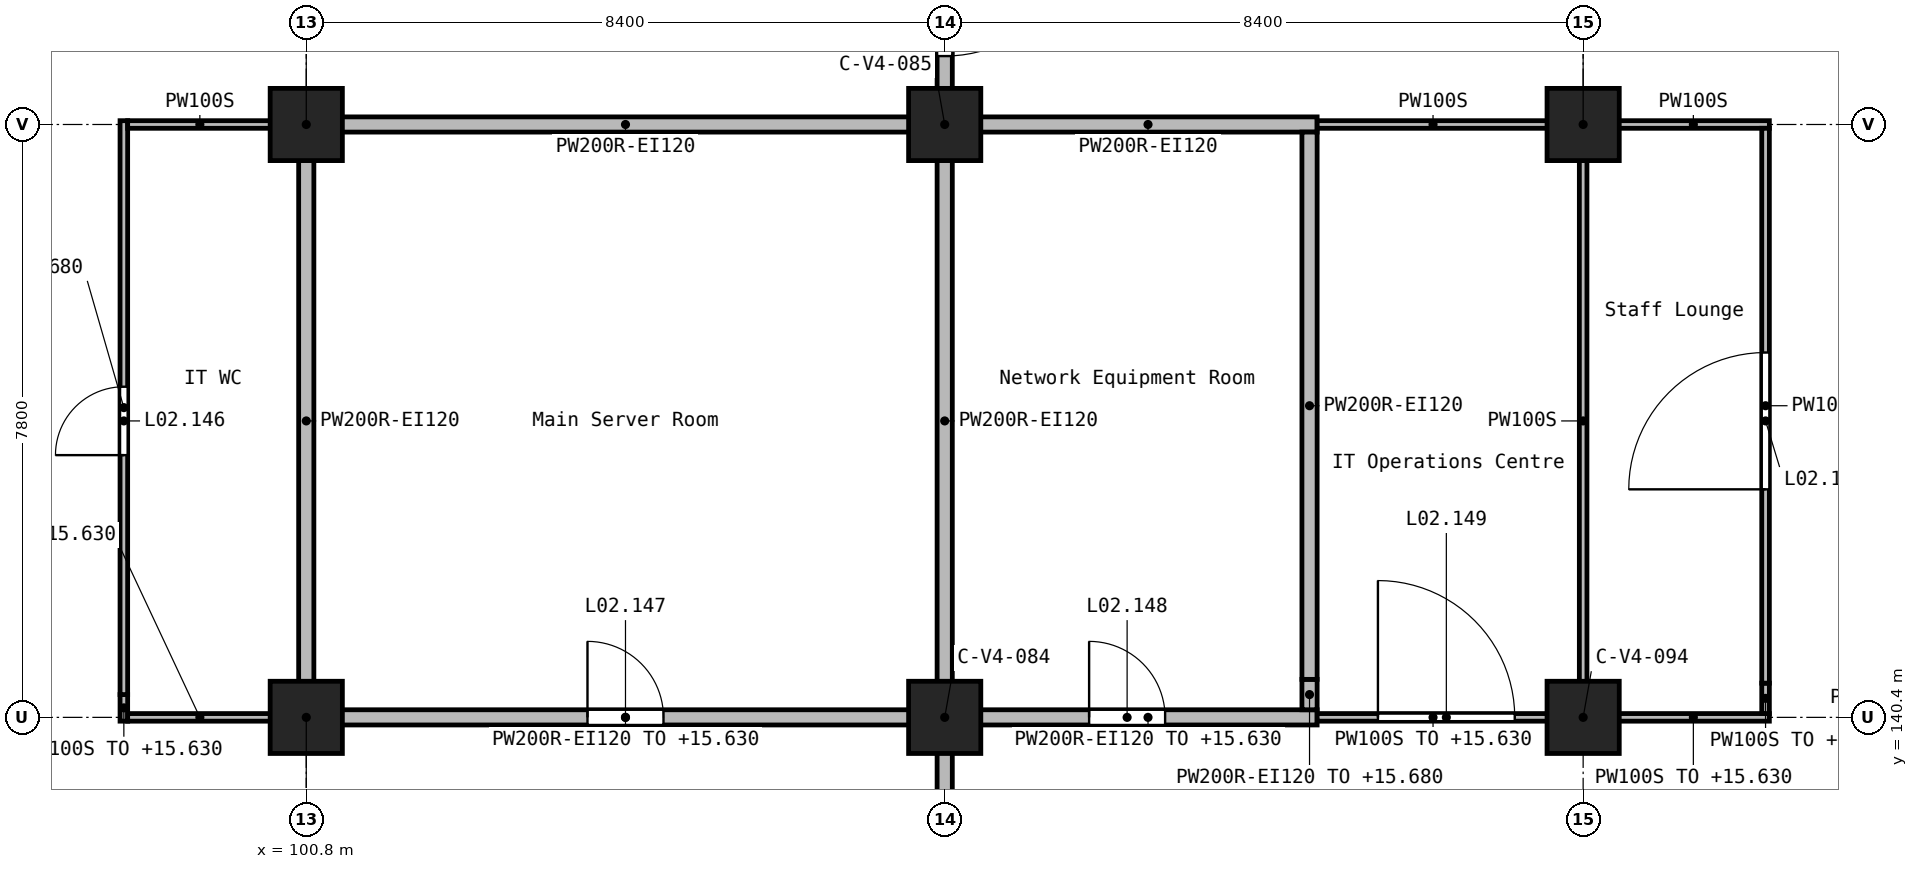
"""IFC4 building model, lengths in metres.
Left out: names, types, materials, properties, quantities, classifications, styles, units other than length and angle.
Written with IfcOpenShell. Run it as: python <this file> out.ifc"""

import sys

from ifc_helpers import new_model, si_unit, direction, frame, frame_2d, origin, origin_2d, place, context, subcontext, project, spatial, rectangle, extrude, element, fill, save


model = new_model("IFC4")
c1 = context("Model", 3, precision=1e-05, world=origin(), true_north=direction((0.0, 1.0)))
c2 = subcontext(c1, "Body", "Model", "MODEL_VIEW")
j1 = project(units=[si_unit("LENGTHUNIT", "METRE"), si_unit("PLANEANGLEUNIT", "RADIAN")], contexts=[c1])
p1 = place(None, origin())
s1 = spatial("IfcSite", under=j1, at=p1, CompositionType="ELEMENT")
p2 = place(p1, origin())
s2 = spatial("IfcBuilding", under=s1, at=p2, CompositionType="ELEMENT")
p3 = place(p2, frame((0.0, 0.0, 12.6)))
s3 = spatial("IfcBuildingStorey", under=s2, at=p3, CompositionType="ELEMENT", Elevation=12.6)
for number, where, z_axis, x_axis in (
    (1, (100.8, 140.4, 0.0), (0.0, 0.0, 1.0), (1.0, 0.0, 0.0)),
    (2, (100.8, 148.2, 0.0), (0.0, 0.0, 1.0), (1.0, 0.0, 0.0)),
    (3, (109.2, 140.4, 0.0), (0.0, 0.0, 1.0), (1.0, 0.0, 0.0)),
    (4, (109.2, 148.2, 0.0), (0.0, 0.0, 1.0), (1.0, 0.0, 0.0)),
    (5, (117.6, 140.4, 0.0), (0.0, 0.0, 1.0), (1.0, 0.0, 0.0)),
    (6, (117.6, 148.2, 0.0), (0.0, 0.0, 1.0), (1.0, 0.0, 0.0)),
):
    element("IfcColumn", number, at=place(p3, frame(where, z_axis=z_axis, x_axis=x_axis)), inside=s3, PredefinedType="COLUMN", context=c2, shape_type="SweptSolid", body=[
        extrude(rectangle(XDim=0.95, YDim=0.95, at=origin_2d()), origin(), (0.0, 0.0, 1.0), 4.2),
    ])
p4 = place(p3, frame((109.2, 151.35, 0.0), z_axis=(0.0, 0.0, 1.0), x_axis=(0.0, -1.0, 0.0)))
e7 = element("IfcWall", 7, at=p4, inside=s3, PredefinedType="SOLIDWALL", context=c2, shape_type="SweptSolid", body=[
    extrude(rectangle(XDim=2.7, YDim=0.2, at=frame_2d((1.35, 0.0))), origin(), (0.0, 0.0, 1.0), 3.85),
])
p5 = place(p4, frame((0.45, 0.0, 0.0)))
e8 = element("IfcOpeningElement", 8, at=p5, cuts=e7, PredefinedType="OPENING", context=c2, shape_type="SweptSolid", body=[
    extrude(rectangle(XDim=1.8, YDim=2.1, at=frame_2d((0.9, 1.05))), frame((0.0, 0.11, 0.0), z_axis=(0.0, -1.0, 0.0), x_axis=(1.0, 0.0, 0.0)), (0.0, 0.0, 1.0), 0.22),
])
p6 = place(p3, frame((109.2, 147.75, 0.0), z_axis=(0.0, 0.0, 1.0), x_axis=(0.0, -1.0, 0.0)))
e9 = element("IfcWall", 9, at=p6, inside=s3, PredefinedType="SOLIDWALL", context=c2, shape_type="SweptSolid", body=[
    extrude(rectangle(XDim=6.9, YDim=0.2, at=frame_2d((3.45, 0.0))), origin(), (0.0, 0.0, 1.0), 3.85),
])
p7 = place(p3, frame((109.2, 139.95, 0.0), z_axis=(0.0, 0.0, 1.0), x_axis=(0.0, -1.0, 0.0)))
e10 = element("IfcWall", 10, at=p7, inside=s3, PredefinedType="SOLIDWALL", context=c2, shape_type="SweptSolid", body=[
    extrude(rectangle(XDim=2.7, YDim=0.2, at=frame_2d((1.35, 0.0))), origin(), (0.0, 0.0, 1.0), 3.85),
])
p8 = place(p3, frame((101.25, 140.4, 0.0), z_axis=(0.0, 0.0, 1.0), x_axis=(1.0, 0.0, 0.0)))
e11 = element("IfcWall", 11, at=p8, inside=s3, PredefinedType="SOLIDWALL", context=c2, shape_type="SweptSolid", body=[
    extrude(rectangle(XDim=7.5, YDim=0.2, at=frame_2d((3.75, 0.0))), origin(), (0.0, 0.0, 1.0), 3.03),
])
p9 = place(p8, frame((3.25, 0.0, 0.0)))
e12 = element("IfcOpeningElement", 12, at=p9, cuts=e11, PredefinedType="OPENING", context=c2, shape_type="SweptSolid", body=[
    extrude(rectangle(XDim=1.0, YDim=2.1, at=frame_2d((0.5, 1.05))), frame((0.0, 0.11, 0.0), z_axis=(0.0, -1.0, 0.0), x_axis=(1.0, 0.0, 0.0)), (0.0, 0.0, 1.0), 0.22),
])
p10 = place(p3, frame((109.65, 140.4, 0.0), z_axis=(0.0, 0.0, 1.0), x_axis=(1.0, 0.0, 0.0)))
e13 = element("IfcWall", 13, at=p10, inside=s3, PredefinedType="SOLIDWALL", context=c2, shape_type="SweptSolid", body=[
    extrude(rectangle(XDim=4.45, YDim=0.2, at=frame_2d((2.225, 0.0))), origin(), (0.0, 0.0, 1.0), 3.03),
])
p11 = place(p10, frame((1.45, 0.0, 0.0)))
e14 = element("IfcOpeningElement", 14, at=p11, cuts=e13, PredefinedType="OPENING", context=c2, shape_type="SweptSolid", body=[
    extrude(rectangle(XDim=1.0, YDim=2.1, at=frame_2d((0.5, 1.05))), frame((0.0, 0.11, 0.0), z_axis=(0.0, -1.0, 0.0), x_axis=(1.0, 0.0, 0.0)), (0.0, 0.0, 1.0), 0.22),
])
p12 = place(p3, frame((101.25, 148.2, 0.0), z_axis=(0.0, 0.0, 1.0), x_axis=(1.0, 0.0, 0.0)))
e15 = element("IfcWall", 15, at=p12, inside=s3, PredefinedType="SOLIDWALL", context=c2, shape_type="SweptSolid", body=[
    extrude(rectangle(XDim=7.5, YDim=0.2, at=frame_2d((3.75, 0.0))), origin(), (0.0, 0.0, 1.0), 3.85),
])
p13 = place(p3, frame((109.65, 148.2, 0.0), z_axis=(0.0, 0.0, 1.0), x_axis=(1.0, 0.0, 0.0)))
e16 = element("IfcWall", 16, at=p13, inside=s3, PredefinedType="SOLIDWALL", context=c2, shape_type="SweptSolid", body=[
    extrude(rectangle(XDim=4.45, YDim=0.2, at=frame_2d((2.225, 0.0))), origin(), (0.0, 0.0, 1.0), 3.85),
])
p14 = place(p3, frame((100.8, 140.85, 0.0), z_axis=(0.0, 0.0, 1.0), x_axis=(0.0, 1.0, 0.0)))
e17 = element("IfcWall", 17, at=p14, inside=s3, PredefinedType="SOLIDWALL", context=c2, shape_type="SweptSolid", body=[
    extrude(rectangle(XDim=6.9, YDim=0.2, at=frame_2d((3.45, 0.0))), origin(), (0.0, 0.0, 1.0), 3.85),
])
p15 = place(p3, frame((114.0, 140.5, 0.0), z_axis=(0.0, 0.0, 1.0), x_axis=(0.0, 1.0, 0.0)))
e18 = element("IfcWall", 18, at=p15, inside=s3, PredefinedType="SOLIDWALL", context=c2, shape_type="SweptSolid", body=[
    extrude(rectangle(XDim=0.4, YDim=0.2, at=frame_2d((0.2, 0.0))), origin(), (0.0, 0.0, 1.0), 3.08),
])
p16 = place(p3, frame((114.0, 140.9, 0.0), z_axis=(0.0, 0.0, 1.0), x_axis=(0.0, 1.0, 0.0)))
e19 = element("IfcWall", 19, at=p16, inside=s3, PredefinedType="SOLIDWALL", context=c2, shape_type="SweptSolid", body=[
    extrude(rectangle(XDim=7.2, YDim=0.2, at=frame_2d((3.6, 0.0))), origin(), (0.0, 0.0, 1.0), 3.85),
])
p17 = place(p3, frame((98.4, 140.35, 0.0), z_axis=(0.0, 0.0, 1.0), x_axis=(0.0, 1.0, 0.0)))
e20 = element("IfcWall", 20, at=p17, inside=s3, PredefinedType="PARTITIONING", context=c2, shape_type="SweptSolid", body=[
    extrude(rectangle(XDim=0.35, YDim=0.1, at=frame_2d((0.175, 0.0))), origin(), (0.0, 0.0, 1.0), 3.03),
])
p18 = place(p3, frame((98.4, 140.7, 0.0), z_axis=(0.0, 0.0, 1.0), x_axis=(0.0, 1.0, 0.0)))
e21 = element("IfcWall", 21, at=p18, inside=s3, PredefinedType="PARTITIONING", context=c2, shape_type="SweptSolid", body=[
    extrude(rectangle(XDim=7.55, YDim=0.1, at=frame_2d((3.775, 0.0))), origin(), (0.0, 0.0, 1.0), 3.08),
])
p19 = place(p18, frame((3.15, 0.0, 0.0)))
e22 = element("IfcOpeningElement", 22, at=p19, cuts=e21, PredefinedType="OPENING", context=c2, shape_type="SweptSolid", body=[
    extrude(rectangle(XDim=0.9, YDim=2.1, at=frame_2d((0.45, 1.05))), frame((0.0, 0.06, 0.0), z_axis=(0.0, -1.0, 0.0), x_axis=(1.0, 0.0, 0.0)), (0.0, 0.0, 1.0), 0.12),
])
p20 = place(p3, frame((114.1, 140.4, 0.0), z_axis=(0.0, 0.0, 1.0), x_axis=(1.0, 0.0, 0.0)))
e23 = element("IfcWall", 23, at=p20, inside=s3, PredefinedType="PARTITIONING", context=c2, shape_type="SweptSolid", body=[
    extrude(rectangle(XDim=3.05, YDim=0.1, at=frame_2d((1.525, 0.0))), origin(), (0.0, 0.0, 1.0), 3.03),
])
p21 = place(p20, frame((0.8, 0.0, 0.0)))
e24 = element("IfcOpeningElement", 24, at=p21, cuts=e23, PredefinedType="OPENING", context=c2, shape_type="SweptSolid", body=[
    extrude(rectangle(XDim=1.8, YDim=2.1, at=frame_2d((0.9, 1.05))), frame((0.0, 0.06, 0.0), z_axis=(0.0, -1.0, 0.0), x_axis=(1.0, 0.0, 0.0)), (0.0, 0.0, 1.0), 0.12),
])
p22 = place(p3, frame((118.05, 140.4, 0.0), z_axis=(0.0, 0.0, 1.0), x_axis=(1.0, 0.0, 0.0)))
e25 = element("IfcWall", 25, at=p22, inside=s3, PredefinedType="PARTITIONING", context=c2, shape_type="SweptSolid", body=[
    extrude(rectangle(XDim=2.0, YDim=0.1, at=frame_2d((1.0, 0.0))), origin(), (0.0, 0.0, 1.0), 3.03),
])
p23 = place(p3, frame((114.1, 148.2, 0.0), z_axis=(0.0, 0.0, 1.0), x_axis=(1.0, 0.0, 0.0)))
e26 = element("IfcWall", 26, at=p23, inside=s3, PredefinedType="PARTITIONING", context=c2, shape_type="SweptSolid", body=[
    extrude(rectangle(XDim=3.05, YDim=0.1, at=frame_2d((1.525, 0.0))), origin(), (0.0, 0.0, 1.0), 3.85),
])
p24 = place(p3, frame((118.05, 148.2, 0.0), z_axis=(0.0, 0.0, 1.0), x_axis=(1.0, 0.0, 0.0)))
e27 = element("IfcWall", 27, at=p24, inside=s3, PredefinedType="PARTITIONING", context=c2, shape_type="SweptSolid", body=[
    extrude(rectangle(XDim=2.0, YDim=0.1, at=frame_2d((1.0, 0.0))), origin(), (0.0, 0.0, 1.0), 3.85),
])
p25 = place(p3, frame((117.6, 140.85, 0.0), z_axis=(0.0, 0.0, 1.0), x_axis=(0.0, 1.0, 0.0)))
e28 = element("IfcWall", 28, at=p25, inside=s3, PredefinedType="PARTITIONING", context=c2, shape_type="SweptSolid", body=[
    extrude(rectangle(XDim=6.9, YDim=0.1, at=frame_2d((3.45, 0.0))), origin(), (0.0, 0.0, 1.0), 3.85),
])
p26 = place(p3, frame((120.0, 140.45, 0.0), z_axis=(0.0, 0.0, 1.0), x_axis=(0.0, 1.0, 0.0)))
e29 = element("IfcWall", 29, at=p26, inside=s3, PredefinedType="PARTITIONING", context=c2, shape_type="SweptSolid", body=[
    extrude(rectangle(XDim=0.4, YDim=0.1, at=frame_2d((0.2, 0.0))), origin(), (0.0, 0.0, 1.0), 3.08),
])
p27 = place(p3, frame((120.0, 140.85, 0.0), z_axis=(0.0, 0.0, 1.0), x_axis=(0.0, 1.0, 0.0)))
e30 = element("IfcWall", 30, at=p27, inside=s3, PredefinedType="PARTITIONING", context=c2, shape_type="SweptSolid", body=[
    extrude(rectangle(XDim=7.3, YDim=0.1, at=frame_2d((3.65, 0.0))), origin(), (0.0, 0.0, 1.0), 3.85),
])
p28 = place(p27, frame((2.55, 0.0, 0.0)))
e31 = element("IfcOpeningElement", 31, at=p28, cuts=e30, PredefinedType="OPENING", context=c2, shape_type="SweptSolid", body=[
    extrude(rectangle(XDim=1.8, YDim=2.1, at=frame_2d((0.9, 1.05))), frame((0.0, 0.06, 0.0), z_axis=(0.0, -1.0, 0.0), x_axis=(1.0, 0.0, 0.0)), (0.0, 0.0, 1.0), 0.12),
])
p29 = place(p3, frame((98.45, 140.4, 0.0), z_axis=(0.0, 0.0, 1.0), x_axis=(1.0, 0.0, 0.0)))
e32 = element("IfcWall", 32, at=p29, inside=s3, PredefinedType="PARTITIONING", context=c2, shape_type="SweptSolid", body=[
    extrude(rectangle(XDim=1.9, YDim=0.1, at=frame_2d((0.95, 0.0))), origin(), (0.0, 0.0, 1.0), 3.03),
])
p30 = place(p3, frame((98.45, 148.2, 0.0), z_axis=(0.0, 0.0, 1.0), x_axis=(1.0, 0.0, 0.0)))
e33 = element("IfcWall", 33, at=p30, inside=s3, PredefinedType="PARTITIONING", context=c2, shape_type="SweptSolid", body=[
    extrude(rectangle(XDim=1.9, YDim=0.1, at=frame_2d((0.95, 0.0))), origin(), (0.0, 0.0, 1.0), 3.85),
])
p31 = place(p5, frame((1.8, 0.0, 0.0), z_axis=(0.0, 0.0, 1.0), x_axis=(-1.0, 0.0, 0.0)))
e34 = element("IfcDoor", 34, at=p31, inside=s3, OperationType="DOUBLE_DOOR_SINGLE_SWING", PredefinedType="DOOR", context=c2, shape_type="SweptSolid", body=[
    extrude(rectangle(XDim=1.8, YDim=2.1, at=frame_2d((0.9, 1.05))), frame((0.0, 0.025, 0.0), z_axis=(0.0, -1.0, 0.0), x_axis=(1.0, 0.0, 0.0)), (0.0, 0.0, 1.0), 0.05),
])
fill(e8, e34)
p32 = place(p19, frame((0.9, 0.0, 0.0), z_axis=(0.0, 0.0, 1.0), x_axis=(-1.0, 0.0, 0.0)))
e35 = element("IfcDoor", 35, at=p32, inside=s3, OperationType="SINGLE_SWING_RIGHT", PredefinedType="DOOR", context=c2, shape_type="SweptSolid", body=[
    extrude(rectangle(XDim=0.9, YDim=2.1, at=frame_2d((0.45, 1.05))), frame((0.0, 0.025, 0.0), z_axis=(0.0, -1.0, 0.0), x_axis=(1.0, 0.0, 0.0)), (0.0, 0.0, 1.0), 0.05),
])
fill(e22, e35)
p33 = place(p9, origin())
e36 = element("IfcDoor", 36, at=p33, inside=s3, OperationType="SINGLE_SWING_LEFT", PredefinedType="DOOR", context=c2, shape_type="SweptSolid", body=[
    extrude(rectangle(XDim=1.0, YDim=2.1, at=frame_2d((0.5, 1.05))), frame((0.0, 0.025, 0.0), z_axis=(0.0, -1.0, 0.0), x_axis=(1.0, 0.0, 0.0)), (0.0, 0.0, 1.0), 0.05),
])
fill(e12, e36)
p34 = place(p11, origin())
e37 = element("IfcDoor", 37, at=p34, inside=s3, OperationType="SINGLE_SWING_LEFT", PredefinedType="DOOR", context=c2, shape_type="SweptSolid", body=[
    extrude(rectangle(XDim=1.0, YDim=2.1, at=frame_2d((0.5, 1.05))), frame((0.0, 0.025, 0.0), z_axis=(0.0, -1.0, 0.0), x_axis=(1.0, 0.0, 0.0)), (0.0, 0.0, 1.0), 0.05),
])
fill(e14, e37)
p35 = place(p21, origin())
e38 = element("IfcDoor", 38, at=p35, inside=s3, OperationType="DOUBLE_DOOR_SINGLE_SWING", PredefinedType="DOOR", context=c2, shape_type="SweptSolid", body=[
    extrude(rectangle(XDim=1.8, YDim=2.1, at=frame_2d((0.9, 1.05))), frame((0.0, 0.025, 0.0), z_axis=(0.0, -1.0, 0.0), x_axis=(1.0, 0.0, 0.0)), (0.0, 0.0, 1.0), 0.05),
])
fill(e24, e38)
p36 = place(p28, origin())
e39 = element("IfcDoor", 39, at=p36, inside=s3, OperationType="DOUBLE_DOOR_SINGLE_SWING", PredefinedType="DOOR", context=c2, shape_type="SweptSolid", body=[
    extrude(rectangle(XDim=1.8, YDim=2.1, at=frame_2d((0.9, 1.05))), frame((0.0, 0.025, 0.0), z_axis=(0.0, -1.0, 0.0), x_axis=(1.0, 0.0, 0.0)), (0.0, 0.0, 1.0), 0.05),
])
fill(e31, e39)
save(model, sys.argv[1])
